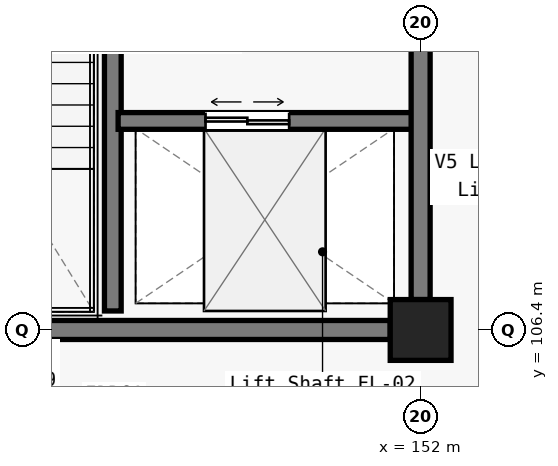
"""IFC4 building model, lengths in metres.
Left out: names, types, materials, properties, quantities, classifications, styles, units other than length and angle.
Written with IfcOpenShell. Run it as: python <this file> out.ifc"""

import sys

from ifc_helpers import new_model, si_unit, direction, frame, frame_2d, origin, origin_2d, place, context, subcontext, project, spatial, rectangle, extrude, element, fill, save


model = new_model("IFC4")
c1 = context("Model", 3, precision=1e-05, world=origin(), true_north=direction((0.0, 1.0)))
c2 = subcontext(c1, "Body", "Model", "MODEL_VIEW")
j1 = project(units=[si_unit("LENGTHUNIT", "METRE"), si_unit("PLANEANGLEUNIT", "RADIAN")], contexts=[c1])
p1 = place(None, origin())
s1 = spatial("IfcSite", under=j1, at=p1, CompositionType="ELEMENT")
p2 = place(p1, origin())
s2 = spatial("IfcBuilding", under=s1, at=p2, CompositionType="ELEMENT")
p3 = place(p2, frame((0.0, 0.0, 5.4)))
s3 = spatial("IfcBuildingStorey", under=s2, at=p3, CompositionType="ELEMENT", Elevation=5.4)
p4 = place(p3, frame((152.0, 106.4, 0.0), z_axis=(0.0, 0.0, 1.0), x_axis=(1.0, 0.0, 0.0)))
e1 = element("IfcColumn", 1, at=p4, inside=s3, PredefinedType="COLUMN", context=c2, shape_type="SweptSolid", body=[
    extrude(rectangle(XDim=0.8, YDim=0.8, at=origin_2d()), origin(), (0.0, 0.0, 1.0), 4.8),
])
p5 = place(p3, frame((144.325, 106.4, 0.0), z_axis=(0.0, 0.0, 1.0), x_axis=(1.0, 0.0, 0.0)))
e2 = element("IfcWall", 2, at=p5, inside=s3, PredefinedType="SOLIDWALL", context=c2, shape_type="SweptSolid", body=[
    extrude(rectangle(XDim=7.275, YDim=0.25, at=frame_2d((3.638, 0.0))), origin(), (0.0, 0.0, 1.0), 3.55),
])
p6 = place(p3, frame((147.95, 106.65, 0.0), z_axis=(0.0, 0.0, 1.0), x_axis=(0.0, 1.0, 0.0)))
e3 = element("IfcWall", 3, at=p6, inside=s3, PredefinedType="SOLIDWALL", context=c2, shape_type="SweptSolid", body=[
    extrude(rectangle(XDim=7.1, YDim=0.22, at=frame_2d((3.55, 0.0))), origin(), (0.0, 0.0, 1.0), 4.51),
])
p7 = place(p6, frame((5.55, 0.0, 0.0)))
e4 = element("IfcOpeningElement", 4, at=p7, cuts=e3, PredefinedType="OPENING", context=c2, shape_type="SweptSolid", body=[
    extrude(rectangle(XDim=1.2, YDim=2.15, at=frame_2d((0.6, 1.075))), frame((0.0, 0.12, 0.0), z_axis=(0.0, -1.0, 0.0), x_axis=(1.0, 0.0, 0.0)), (0.0, 0.0, 1.0), 0.24),
])
p8 = place(p3, frame((148.02, 109.15, 0.0), z_axis=(0.0, 0.0, 1.0), x_axis=(1.0, 0.0, 0.0)))
e5 = element("IfcWall", 5, at=p8, inside=s3, PredefinedType="SOLIDWALL", context=c2, shape_type="SweptSolid", body=[
    extrude(rectangle(XDim=3.93, YDim=0.22, at=frame_2d((1.965, 0.0))), origin(), (0.0, 0.0, 1.0), 3.86),
])
p9 = place(p8, frame((1.15, 0.0, 0.0)))
e6 = element("IfcOpeningElement", 6, at=p9, cuts=e5, PredefinedType="OPENING", context=c2, shape_type="SweptSolid", body=[
    extrude(rectangle(XDim=1.1, YDim=2.2, at=frame_2d((0.55, 1.1))), frame((0.0, 0.12, 0.0), z_axis=(0.0, -1.0, 0.0), x_axis=(1.0, 0.0, 0.0)), (0.0, 0.0, 1.0), 0.24),
])
p10 = place(p3, frame((152.0, 106.8, 0.0), z_axis=(0.0, 0.0, 1.0), x_axis=(0.0, 1.0, 0.0)))
e7 = element("IfcWall", 7, at=p10, inside=s3, PredefinedType="SOLIDWALL", context=c2, shape_type="SweptSolid", body=[
    extrude(rectangle(XDim=6.85, YDim=0.25, at=frame_2d((3.425, 0.0))), origin(), (0.0, 0.0, 1.0), 3.735),
])
p11 = place(p10, frame((3.45, 0.0, 0.0)))
e8 = element("IfcOpeningElement", 8, at=p11, cuts=e7, PredefinedType="OPENING", context=c2, shape_type="SweptSolid", body=[
    extrude(rectangle(XDim=1.35, YDim=2.2, at=frame_2d((0.675, 1.1))), frame((0.0, 0.135, 0.0), z_axis=(0.0, -1.0, 0.0), x_axis=(1.0, 0.0, 0.0)), (0.0, 0.0, 1.0), 0.27),
])
p12 = place(p9, origin())
e9 = element("IfcDoor", 9, at=p12, inside=s3, OperationType="DOUBLE_DOOR_SLIDING", PredefinedType="DOOR", context=c2, shape_type="SweptSolid", body=[
    extrude(rectangle(XDim=1.1, YDim=2.2, at=frame_2d((0.55, 1.1))), frame((0.0, 0.025, 0.0), z_axis=(0.0, -1.0, 0.0), x_axis=(1.0, 0.0, 0.0)), (0.0, 0.0, 1.0), 0.05),
])
fill(e6, e9)
save(model, sys.argv[1])
